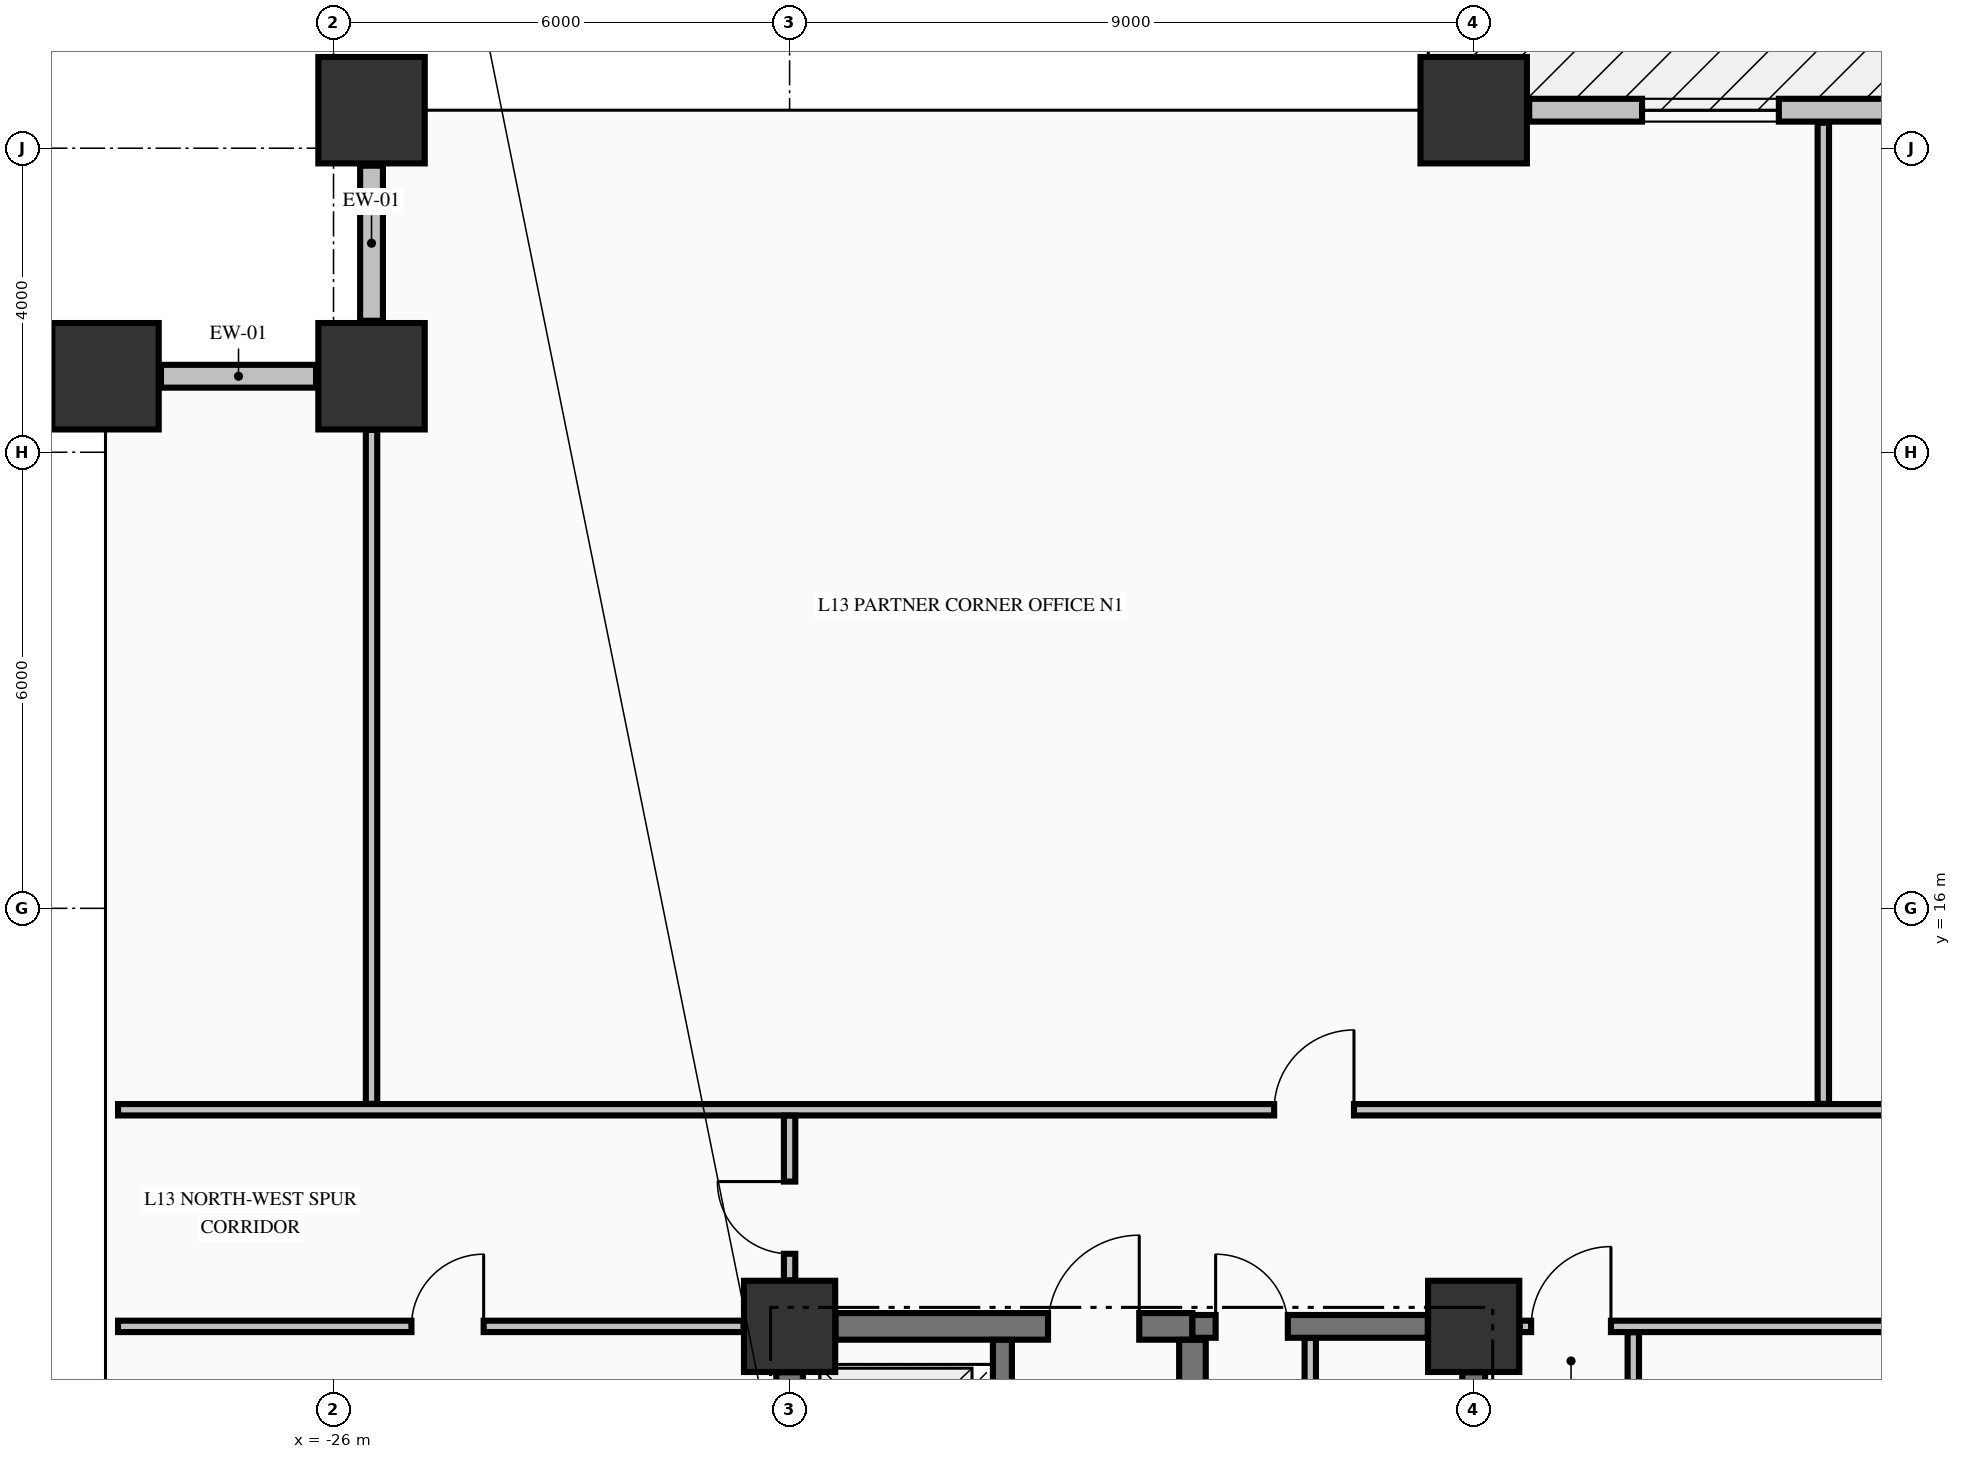
"""IFC4 building model, lengths in metres.
Left out: names, types, materials, properties, quantities, classifications, styles, units other than length and angle.
Written with IfcOpenShell. Run it as: python <this file> out.ifc"""

import sys

from ifc_helpers import new_model, si_unit, direction, frame, frame_2d, origin, origin_2d, place, context, subcontext, project, spatial, rectangle, extrude, element, fill, save


model = new_model("IFC4")
c1 = context("Model", 3, precision=1e-05, world=origin(), true_north=direction((0.0, 1.0)))
c2 = subcontext(c1, "Body", "Model", "MODEL_VIEW")
j1 = project(units=[si_unit("LENGTHUNIT", "METRE"), si_unit("PLANEANGLEUNIT", "RADIAN")], contexts=[c1])
p1 = place(None, origin())
s1 = spatial("IfcSite", under=j1, at=p1, CompositionType="ELEMENT")
p2 = place(p1, origin())
s2 = spatial("IfcBuilding", under=s1, at=p2, CompositionType="ELEMENT")
p3 = place(p2, frame((0.0, 0.0, 57.19)))
s3 = spatial("IfcBuildingStorey", under=s2, at=p3, CompositionType="ELEMENT", Elevation=57.19)
for number, where, z_axis, x_axis in (
    (1, (-25.5, 26.5, -0.425), (0.0, 0.0, 1.0), (1.0, 0.0, 0.0)),
    (2, (-11.0, 26.5, -0.425), (0.0, 0.0, 1.0), (1.0, 0.0, 0.0)),
    (3, (-29.0, 23.0, -0.425), (0.0, 0.0, 1.0), (1.0, 0.0, 0.0)),
    (4, (-25.5, 23.0, -0.425), (0.0, 0.0, 1.0), (1.0, 0.0, 0.0)),
):
    element("IfcColumn", number, at=place(p3, frame(where, z_axis=z_axis, x_axis=x_axis)), inside=s3, PredefinedType="COLUMN", context=c2, shape_type="SweptSolid", body=[
        extrude(rectangle(XDim=1.4, YDim=1.4, at=origin_2d()), origin(), (0.0, 0.0, 1.0), 3.695),
    ])
for number, where, z_axis, x_axis in (
    (5, (-20.0, 10.5, -0.425), (0.0, 0.0, 1.0), (1.0, 0.0, 0.0)),
    (6, (-11.0, 10.5, -0.425), (0.0, 0.0, 1.0), (1.0, 0.0, 0.0)),
):
    element("IfcColumn", number, at=place(p3, frame(where, z_axis=z_axis, x_axis=x_axis)), inside=s3, PredefinedType="COLUMN", context=c2, shape_type="SweptSolid", body=[
        extrude(rectangle(XDim=1.2, YDim=1.2, at=origin_2d()), origin(), (0.0, 0.0, 1.0), 3.695),
    ])
for number, where, z_axis, x_axis in (
    (7, (-25.5, 25.77, 0.0), (0.0, 0.0, 1.0), (0.0, -1.0, 0.0)),
    (8, (-26.23, 23.0, 0.0), (0.0, 0.0, 1.0), (-1.0, 0.0, 0.0)),
):
    element("IfcWall", number, at=place(p3, frame(where, z_axis=z_axis, x_axis=x_axis)), inside=s3, PredefinedType="STANDARD", context=c2, shape_type="SweptSolid", body=[
        extrude(rectangle(XDim=2.04, YDim=0.3, at=frame_2d((1.02, 0.0))), origin(), (0.0, 0.0, 1.0), 1.462),
    ])
p4 = place(p3, frame((-0.73, 26.5, 0.0), z_axis=(0.0, 0.0, 1.0), x_axis=(-1.0, 0.0, 0.0)))
e9 = element("IfcWall", 9, at=p4, inside=s3, PredefinedType="STANDARD", context=c2, shape_type="SweptSolid", body=[
    extrude(rectangle(XDim=9.54, YDim=0.3, at=frame_2d((4.77, 0.0))), origin(), (0.0, 0.0, 1.0), 2.662),
])
p5 = place(p4, frame((0.2, 0.0, 0.0)))
e10 = element("IfcOpeningElement", 10, at=p5, cuts=e9, PredefinedType="OPENING", context=c2, shape_type="SweptSolid", body=[
    extrude(rectangle(XDim=1.1, YDim=2.15, at=frame_2d((0.55, 1.075))), frame((0.0, 0.16, 0.0), z_axis=(0.0, -1.0, 0.0), x_axis=(1.0, 0.0, 0.0)), (0.0, 0.0, 1.0), 0.32),
])
p6 = place(p4, frame((6.255, 0.0, 0.78)))
e11 = element("IfcOpeningElement", 11, at=p6, cuts=e9, PredefinedType="OPENING", context=c2, shape_type="SweptSolid", body=[
    extrude(rectangle(XDim=1.8, YDim=1.72, at=frame_2d((0.9, 0.86))), frame((0.0, 0.16, 0.0), z_axis=(0.0, -1.0, 0.0), x_axis=(1.0, 0.0, 0.0)), (0.0, 0.0, 1.0), 0.32),
])
p7 = place(p3, frame((-19.396, 10.5, 0.0), z_axis=(0.0, 0.0, 1.0), x_axis=(1.0, 0.0, 0.0)))
e12 = element("IfcWall", 12, at=p7, inside=s3, PredefinedType="SHEAR", context=c2, shape_type="SweptSolid", body=[
    extrude(rectangle(XDim=4.696, YDim=0.35, at=frame_2d((2.348, 0.0))), origin(), (0.0, 0.0, 1.0), 3.27),
])
p8 = place(p7, frame((2.796, 0.0, 0.0)))
e13 = element("IfcOpeningElement", 13, at=p8, cuts=e12, PredefinedType="OPENING", context=c2, shape_type="SweptSolid", body=[
    extrude(rectangle(XDim=1.2, YDim=2.15, at=frame_2d((0.6, 1.075))), frame((0.0, 0.185, 0.0), z_axis=(0.0, -1.0, 0.0), x_axis=(1.0, 0.0, 0.0)), (0.0, 0.0, 1.0), 0.37),
])
p9 = place(p3, frame((-14.7, 10.5, 0.0), z_axis=(0.0, 0.0, 1.0), x_axis=(1.0, 0.0, 0.0)))
e14 = element("IfcWall", 14, at=p9, inside=s3, PredefinedType="SHEAR", context=c2, shape_type="SweptSolid", body=[
    extrude(rectangle(XDim=3.096, YDim=0.3, at=frame_2d((1.548, 0.0))), origin(), (0.0, 0.0, 1.0), 3.27),
])
p10 = place(p9, frame((0.305, 0.0, 0.0)))
e15 = element("IfcOpeningElement", 15, at=p10, cuts=e14, PredefinedType="OPENING", context=c2, shape_type="SweptSolid", body=[
    extrude(rectangle(XDim=0.95, YDim=2.15, at=frame_2d((0.475, 1.075))), frame((0.0, 0.16, 0.0), z_axis=(0.0, -1.0, 0.0), x_axis=(1.0, 0.0, 0.0)), (0.0, 0.0, 1.0), 0.32),
])
p11 = place(p3, frame((-28.835, 10.5, 0.0), z_axis=(0.0, 0.0, 1.0), x_axis=(1.0, 0.0, 0.0)))
e16 = element("IfcWall", 16, at=p11, inside=s3, PredefinedType="PARTITIONING", context=c2, shape_type="SweptSolid", body=[
    extrude(rectangle(XDim=8.229, YDim=0.15, at=frame_2d((4.115, 0.0))), origin(), (0.0, 0.0, 1.0), 3.27),
])
p12 = place(p11, frame((3.86, 0.0, 0.0)))
e17 = element("IfcOpeningElement", 17, at=p12, cuts=e16, PredefinedType="OPENING", context=c2, shape_type="SweptSolid", body=[
    extrude(rectangle(XDim=0.95, YDim=2.15, at=frame_2d((0.475, 1.075))), frame((0.0, 0.085, 0.0), z_axis=(0.0, -1.0, 0.0), x_axis=(1.0, 0.0, 0.0)), (0.0, 0.0, 1.0), 0.17),
])
p13 = place(p3, frame((-10.394, 10.5, 0.0), z_axis=(0.0, 0.0, 1.0), x_axis=(1.0, 0.0, 0.0)))
e18 = element("IfcWall", 18, at=p13, inside=s3, PredefinedType="PARTITIONING", context=c2, shape_type="SweptSolid", body=[
    extrude(rectangle(XDim=20.788, YDim=0.15, at=frame_2d((10.394, 0.0))), origin(), (0.0, 0.0, 1.0), 3.27),
])
p14 = place(p13, frame((0.15, 0.0, 0.0)))
e19 = element("IfcOpeningElement", 19, at=p14, cuts=e18, PredefinedType="OPENING", context=c2, shape_type="SweptSolid", body=[
    extrude(rectangle(XDim=1.05, YDim=2.15, at=frame_2d((0.525, 1.075))), frame((0.0, 0.085, 0.0), z_axis=(0.0, -1.0, 0.0), x_axis=(1.0, 0.0, 0.0)), (0.0, 0.0, 1.0), 0.17),
])
p15 = place(p13, frame((19.588, 0.0, 0.0)))
e20 = element("IfcOpeningElement", 20, at=p15, cuts=e18, PredefinedType="OPENING", context=c2, shape_type="SweptSolid", body=[
    extrude(rectangle(XDim=1.05, YDim=2.15, at=frame_2d((0.525, 1.075))), frame((0.0, 0.085, 0.0), z_axis=(0.0, -1.0, 0.0), x_axis=(1.0, 0.0, 0.0)), (0.0, 0.0, 1.0), 0.17),
])
p16 = place(p3, frame((-28.835, 13.35, 0.0), z_axis=(0.0, 0.0, 1.0), x_axis=(1.0, 0.0, 0.0)))
e21 = element("IfcWall", 21, at=p16, inside=s3, PredefinedType="PARTITIONING", context=c2, shape_type="SweptSolid", body=[
    extrude(rectangle(XDim=52.67, YDim=0.15, at=frame_2d((26.335, 0.0))), origin(), (0.0, 0.0, 1.0), 3.27),
])
p17 = place(p16, frame((15.21, 0.0, 0.0)))
e22 = element("IfcOpeningElement", 22, at=p17, cuts=e21, PredefinedType="OPENING", context=c2, shape_type="SweptSolid", body=[
    extrude(rectangle(XDim=1.05, YDim=2.15, at=frame_2d((0.525, 1.075))), frame((0.0, 0.085, 0.0), z_axis=(0.0, -1.0, 0.0), x_axis=(1.0, 0.0, 0.0)), (0.0, 0.0, 1.0), 0.17),
])
p18 = place(p16, frame((31.26, 0.0, 0.0)))
e23 = element("IfcOpeningElement", 23, at=p18, cuts=e21, PredefinedType="OPENING", context=c2, shape_type="SweptSolid", body=[
    extrude(rectangle(XDim=1.05, YDim=2.15, at=frame_2d((0.525, 1.075))), frame((0.0, 0.085, 0.0), z_axis=(0.0, -1.0, 0.0), x_axis=(1.0, 0.0, 0.0)), (0.0, 0.0, 1.0), 0.17),
])
p19 = place(p16, frame((34.56, 0.0, 0.0)))
e24 = element("IfcOpeningElement", 24, at=p19, cuts=e21, PredefinedType="OPENING", context=c2, shape_type="SweptSolid", body=[
    extrude(rectangle(XDim=1.05, YDim=2.15, at=frame_2d((0.525, 1.075))), frame((0.0, 0.085, 0.0), z_axis=(0.0, -1.0, 0.0), x_axis=(1.0, 0.0, 0.0)), (0.0, 0.0, 1.0), 0.17),
])
p20 = place(p3, frame((-20.0, 7.727, 0.0), z_axis=(0.0, 0.0, 1.0), x_axis=(0.0, 1.0, 0.0)))
e25 = element("IfcWall", 25, at=p20, inside=s3, PredefinedType="SHEAR", context=c2, shape_type="SweptSolid", body=[
    extrude(rectangle(XDim=2.169, YDim=0.35, at=frame_2d((1.084, 0.0))), origin(), (0.0, 0.0, 1.0), 3.27),
])
p21 = place(p3, frame((-17.2, 7.727, 0.0), z_axis=(0.0, 0.0, 1.0), x_axis=(0.0, 1.0, 0.0)))
e26 = element("IfcWall", 26, at=p21, inside=s3, PredefinedType="SOLIDWALL", context=c2, shape_type="SweptSolid", body=[
    extrude(rectangle(XDim=2.596, YDim=0.25, at=frame_2d((1.298, 0.0))), origin(), (0.0, 0.0, 1.0), 3.27),
])
p22 = place(p21, frame((0.773, 0.0, 0.0)))
e27 = element("IfcOpeningElement", 27, at=p22, cuts=e26, PredefinedType="OPENING", context=c2, shape_type="SweptSolid", body=[
    extrude(rectangle(XDim=1.1, YDim=2.2, at=frame_2d((0.55, 1.1))), frame((0.0, 0.135, 0.0), z_axis=(0.0, -1.0, 0.0), x_axis=(1.0, 0.0, 0.0)), (0.0, 0.0, 1.0), 0.27),
])
p23 = place(p3, frame((-14.7, 5.852, 0.0), z_axis=(0.0, 0.0, 1.0), x_axis=(0.0, 1.0, 0.0)))
e28 = element("IfcWall", 28, at=p23, inside=s3, PredefinedType="SHEAR", context=c2, shape_type="SweptSolid", body=[
    extrude(rectangle(XDim=4.471, YDim=0.35, at=frame_2d((2.235, 0.0))), origin(), (0.0, 0.0, 1.0), 3.27),
])
p24 = place(p3, frame((-11.0, 5.852, 0.0), z_axis=(0.0, 0.0, 1.0), x_axis=(0.0, 1.0, 0.0)))
e29 = element("IfcWall", 29, at=p24, inside=s3, PredefinedType="SHEAR", context=c2, shape_type="SweptSolid", body=[
    extrude(rectangle(XDim=4.044, YDim=0.3, at=frame_2d((2.022, 0.0))), origin(), (0.0, 0.0, 1.0), 3.27),
])
p25 = place(p3, frame((-25.5, 13.428, 0.0), z_axis=(0.0, 0.0, 1.0), x_axis=(0.0, 1.0, 0.0)))
e30 = element("IfcWall", 30, at=p25, inside=s3, PredefinedType="PARTITIONING", context=c2, shape_type="SweptSolid", body=[
    extrude(rectangle(XDim=8.866, YDim=0.15, at=frame_2d((4.433, 0.0))), origin(), (0.0, 0.0, 1.0), 3.27),
])
p26 = place(p3, frame((-20.0, 11.106, 0.0), z_axis=(0.0, 0.0, 1.0), x_axis=(0.0, 1.0, 0.0)))
e31 = element("IfcWall", 31, at=p26, inside=s3, PredefinedType="PARTITIONING", context=c2, shape_type="SweptSolid", body=[
    extrude(rectangle(XDim=2.166, YDim=0.15, at=frame_2d((1.083, 0.0))), origin(), (0.0, 0.0, 1.0), 2.61),
])
p27 = place(p26, frame((0.349, 0.0, 0.0)))
e32 = element("IfcOpeningElement", 32, at=p27, cuts=e31, PredefinedType="OPENING", context=c2, shape_type="SweptSolid", body=[
    extrude(rectangle(XDim=0.95, YDim=2.15, at=frame_2d((0.475, 1.075))), frame((0.0, 0.085, 0.0), z_axis=(0.0, -1.0, 0.0), x_axis=(1.0, 0.0, 0.0)), (0.0, 0.0, 1.0), 0.17),
])
p28 = place(p3, frame((-13.15, 7.228, 0.0), z_axis=(0.0, 0.0, 1.0), x_axis=(0.0, 1.0, 0.0)))
e33 = element("IfcWall", 33, at=p28, inside=s3, PredefinedType="PARTITIONING", context=c2, shape_type="SweptSolid", body=[
    extrude(rectangle(XDim=3.119, YDim=0.15, at=frame_2d((1.56, 0.0))), origin(), (0.0, 0.0, 1.0), 3.27),
])
p29 = place(p28, frame((1.097, 0.0, 0.0)))
e34 = element("IfcOpeningElement", 34, at=p29, cuts=e33, PredefinedType="OPENING", context=c2, shape_type="SweptSolid", body=[
    extrude(rectangle(XDim=0.95, YDim=2.15, at=frame_2d((0.475, 1.075))), frame((0.0, 0.085, 0.0), z_axis=(0.0, -1.0, 0.0), x_axis=(1.0, 0.0, 0.0)), (0.0, 0.0, 1.0), 0.17),
])
p30 = place(p3, frame((-8.9, 2.303, 0.0), z_axis=(0.0, 0.0, 1.0), x_axis=(0.0, 1.0, 0.0)))
e35 = element("IfcWall", 35, at=p30, inside=s3, PredefinedType="PARTITIONING", context=c2, shape_type="SweptSolid", body=[
    extrude(rectangle(XDim=8.119, YDim=0.15, at=frame_2d((4.06, 0.0))), origin(), (0.0, 0.0, 1.0), 3.27),
])
p31 = place(p30, frame((3.522, 0.0, 0.0)))
e36 = element("IfcOpeningElement", 36, at=p31, cuts=e35, PredefinedType="OPENING", context=c2, shape_type="SweptSolid", body=[
    extrude(rectangle(XDim=1.05, YDim=2.15, at=frame_2d((0.525, 1.075))), frame((0.0, 0.085, 0.0), z_axis=(0.0, -1.0, 0.0), x_axis=(1.0, 0.0, 0.0)), (0.0, 0.0, 1.0), 0.17),
])
p32 = place(p3, frame((-6.4, 13.428, 0.0), z_axis=(0.0, 0.0, 1.0), x_axis=(0.0, 1.0, 0.0)))
e37 = element("IfcWall", 37, at=p32, inside=s3, PredefinedType="PARTITIONING", context=c2, shape_type="SweptSolid", body=[
    extrude(rectangle(XDim=12.907, YDim=0.15, at=frame_2d((6.454, 0.0))), origin(), (0.0, 0.0, 1.0), 3.27),
])
p33 = place(p6, origin())
e38 = element("IfcWindow", 38, at=p33, inside=s3, PartitioningType="SINGLE_PANEL", PredefinedType="WINDOW", context=c2, shape_type="SweptSolid", body=[
    extrude(rectangle(XDim=1.8, YDim=1.72, at=frame_2d((0.9, 0.86))), frame((0.0, 0.03, 0.0), z_axis=(0.0, -1.0, 0.0), x_axis=(1.0, 0.0, 0.0)), (0.0, 0.0, 1.0), 0.06),
])
fill(e11, e38)
p34 = place(p10, origin())
e39 = element("IfcDoor", 39, at=p34, inside=s3, OperationType="SINGLE_SWING_LEFT", PredefinedType="DOOR", context=c2, shape_type="SweptSolid", body=[
    extrude(rectangle(XDim=0.95, YDim=2.15, at=frame_2d((0.475, 1.075))), frame((0.0, 0.025, 0.0), z_axis=(0.0, -1.0, 0.0), x_axis=(1.0, 0.0, 0.0)), (0.0, 0.0, 1.0), 0.05),
])
fill(e15, e39)
p35 = place(p8, origin())
e40 = element("IfcDoor", 40, at=p35, inside=s3, OperationType="SINGLE_SWING_RIGHT", PredefinedType="DOOR", context=c2, shape_type="SweptSolid", body=[
    extrude(rectangle(XDim=1.2, YDim=2.15, at=frame_2d((0.6, 1.075))), frame((0.0, 0.025, 0.0), z_axis=(0.0, -1.0, 0.0), x_axis=(1.0, 0.0, 0.0)), (0.0, 0.0, 1.0), 0.05),
])
fill(e13, e40)
p36 = place(p14, origin())
e41 = element("IfcDoor", 41, at=p36, inside=s3, OperationType="SINGLE_SWING_RIGHT", PredefinedType="DOOR", context=c2, shape_type="SweptSolid", body=[
    extrude(rectangle(XDim=1.05, YDim=2.15, at=frame_2d((0.525, 1.075))), frame((0.0, 0.025, 0.0), z_axis=(0.0, -1.0, 0.0), x_axis=(1.0, 0.0, 0.0)), (0.0, 0.0, 1.0), 0.05),
])
fill(e19, e41)
p37 = place(p17, origin())
e42 = element("IfcDoor", 42, at=p37, inside=s3, OperationType="SINGLE_SWING_RIGHT", PredefinedType="DOOR", context=c2, shape_type="SweptSolid", body=[
    extrude(rectangle(XDim=1.05, YDim=2.15, at=frame_2d((0.525, 1.075))), frame((0.0, 0.025, 0.0), z_axis=(0.0, -1.0, 0.0), x_axis=(1.0, 0.0, 0.0)), (0.0, 0.0, 1.0), 0.05),
])
fill(e22, e42)
p38 = place(p27, origin())
e43 = element("IfcDoor", 43, at=p38, inside=s3, OperationType="SINGLE_SWING_RIGHT", PredefinedType="DOOR", context=c2, shape_type="SweptSolid", body=[
    extrude(rectangle(XDim=0.95, YDim=2.15, at=frame_2d((0.475, 1.075))), frame((0.0, 0.025, 0.0), z_axis=(0.0, -1.0, 0.0), x_axis=(1.0, 0.0, 0.0)), (0.0, 0.0, 1.0), 0.05),
])
fill(e32, e43)
p39 = place(p12, origin())
e44 = element("IfcDoor", 44, at=p39, inside=s3, OperationType="SINGLE_SWING_RIGHT", PredefinedType="DOOR", context=c2, shape_type="SweptSolid", body=[
    extrude(rectangle(XDim=0.95, YDim=2.15, at=frame_2d((0.475, 1.075))), frame((0.0, 0.025, 0.0), z_axis=(0.0, -1.0, 0.0), x_axis=(1.0, 0.0, 0.0)), (0.0, 0.0, 1.0), 0.05),
])
fill(e17, e44)
save(model, sys.argv[1])
